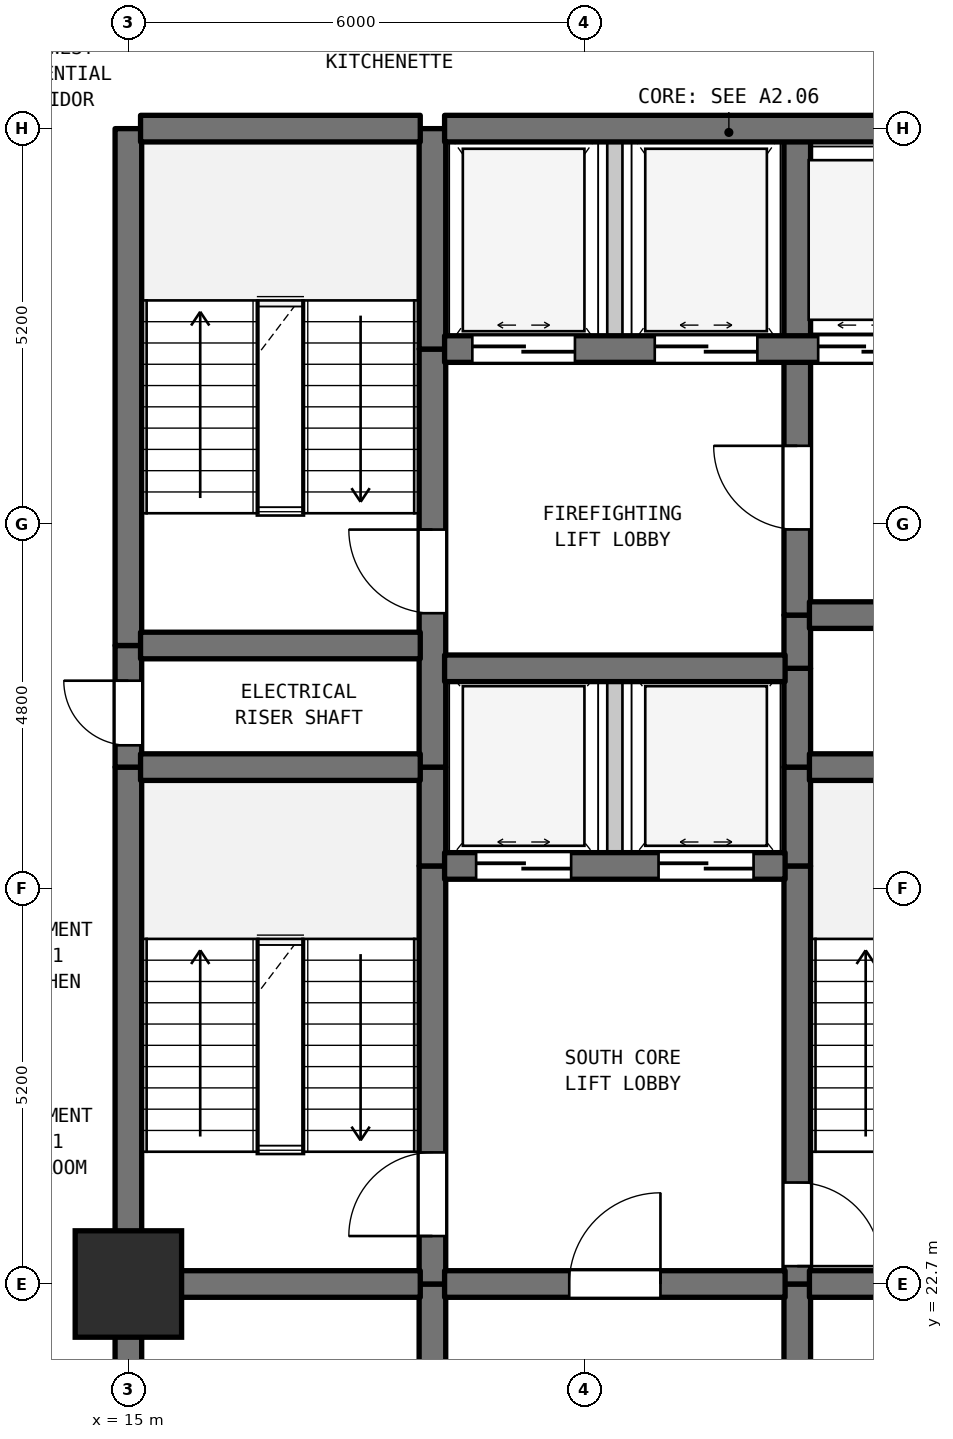
"""IFC4 building model, lengths in metres.
Left out: names, types, materials, properties, quantities, classifications, styles, units other than length and angle.
Written with IfcOpenShell. Run it as: python <this file> out.ifc"""

import sys

from ifc_helpers import new_model, si_unit, direction, frame, frame_2d, origin, origin_2d, place, context, subcontext, project, spatial, rectangle, extrude, element, fill, save


model = new_model("IFC4")
c1 = context("Model", 3, precision=1e-05, world=origin(), true_north=direction((0.0, 1.0)))
c2 = subcontext(c1, "Body", "Model", "MODEL_VIEW")
j1 = project(units=[si_unit("LENGTHUNIT", "METRE"), si_unit("PLANEANGLEUNIT", "RADIAN")], contexts=[c1])
p1 = place(None, origin())
s1 = spatial("IfcSite", under=j1, at=p1, CompositionType="ELEMENT")
p2 = place(p1, origin())
s2 = spatial("IfcBuilding", under=s1, at=p2, CompositionType="ELEMENT")
p3 = place(p2, frame((0.0, 0.0, 31.4)))
s3 = spatial("IfcBuildingStorey", under=s2, at=p3, CompositionType="ELEMENT", Elevation=31.4)
p4 = place(p3, frame((15.0, 22.7, 0.0), z_axis=(0.0, 0.0, 1.0), x_axis=(1.0, 0.0, 0.0)))
e1 = element("IfcColumn", 1, at=p4, inside=s3, PredefinedType="COLUMN", context=c2, shape_type="SweptSolid", body=[
    extrude(rectangle(XDim=1.4, YDim=1.4, at=origin_2d()), origin(), (0.0, 0.0, 1.0), 3.7),
])
p5 = place(p3, frame((15.0, 19.5, 0.0), z_axis=(0.0, 0.0, 1.0), x_axis=(0.0, 1.0, 0.0)))
e2 = element("IfcWall", 2, at=p5, inside=s3, PredefinedType="SHEAR", context=c2, shape_type="SweptSolid", body=[
    extrude(rectangle(XDim=3.2, YDim=0.35, at=frame_2d((1.6, 0.0))), origin(), (0.0, 0.0, 1.0), 3.385),
])
p6 = place(p3, frame((15.0, 22.7, 0.0), z_axis=(0.0, 0.0, 1.0), x_axis=(0.0, 1.0, 0.0)))
e3 = element("IfcWall", 3, at=p6, inside=s3, PredefinedType="SHEAR", context=c2, shape_type="SweptSolid", body=[
    extrude(rectangle(XDim=6.8, YDim=0.35, at=frame_2d((3.4, 0.0))), origin(), (0.0, 0.0, 1.0), 3.385),
])
p7 = place(p3, frame((15.0, 29.5, 0.0), z_axis=(0.0, 0.0, 1.0), x_axis=(0.0, 1.0, 0.0)))
e4 = element("IfcWall", 4, at=p7, inside=s3, PredefinedType="SHEAR", context=c2, shape_type="SweptSolid", body=[
    extrude(rectangle(XDim=1.6, YDim=0.35, at=frame_2d((0.8, 0.0))), origin(), (0.0, 0.0, 1.0), 3.385),
])
p8 = place(p7, frame((0.287, 0.0, 0.0)))
e5 = element("IfcOpeningElement", 5, at=p8, cuts=e4, PredefinedType="OPENING", context=c2, shape_type="SweptSolid", body=[
    extrude(rectangle(XDim=0.85, YDim=2.1, at=frame_2d((0.425, 1.05))), frame((0.0, 0.185, 0.0), z_axis=(0.0, -1.0, 0.0), x_axis=(1.0, 0.0, 0.0)), (0.0, 0.0, 1.0), 0.37),
])
p9 = place(p3, frame((15.0, 31.1, 0.0), z_axis=(0.0, 0.0, 1.0), x_axis=(0.0, 1.0, 0.0)))
e6 = element("IfcWall", 6, at=p9, inside=s3, PredefinedType="SHEAR", context=c2, shape_type="SweptSolid", body=[
    extrude(rectangle(XDim=6.8, YDim=0.35, at=frame_2d((3.4, 0.0))), origin(), (0.0, 0.0, 1.0), 3.385),
])
p10 = place(p3, frame((19.0, 19.5, 0.0), z_axis=(0.0, 0.0, 1.0), x_axis=(0.0, 1.0, 0.0)))
e7 = element("IfcWall", 7, at=p10, inside=s3, PredefinedType="SHEAR", context=c2, shape_type="SweptSolid", body=[
    extrude(rectangle(XDim=3.2, YDim=0.35, at=frame_2d((1.6, 0.0))), origin(), (0.0, 0.0, 1.0), 3.385),
])
p11 = place(p3, frame((19.0, 22.7, 0.0), z_axis=(0.0, 0.0, 1.0), x_axis=(0.0, 1.0, 0.0)))
e8 = element("IfcWall", 8, at=p11, inside=s3, PredefinedType="SHEAR", context=c2, shape_type="SweptSolid", body=[
    extrude(rectangle(XDim=5.5, YDim=0.35, at=frame_2d((2.75, 0.0))), origin(), (0.0, 0.0, 1.0), 3.385),
])
p12 = place(p11, frame((0.631, 0.0, 0.0)))
e9 = element("IfcOpeningElement", 9, at=p12, cuts=e8, PredefinedType="OPENING", context=c2, shape_type="SweptSolid", body=[
    extrude(rectangle(XDim=1.1, YDim=2.15, at=frame_2d((0.55, 1.075))), frame((0.0, 0.185, 0.0), z_axis=(0.0, -1.0, 0.0), x_axis=(1.0, 0.0, 0.0)), (0.0, 0.0, 1.0), 0.37),
])
p13 = place(p3, frame((19.0, 28.2, 0.0), z_axis=(0.0, 0.0, 1.0), x_axis=(0.0, 1.0, 0.0)))
e10 = element("IfcWall", 10, at=p13, inside=s3, PredefinedType="SHEAR", context=c2, shape_type="SweptSolid", body=[
    extrude(rectangle(XDim=1.3, YDim=0.35, at=frame_2d((0.65, 0.0))), origin(), (0.0, 0.0, 1.0), 3.385),
])
p14 = place(p3, frame((19.0, 29.5, 0.0), z_axis=(0.0, 0.0, 1.0), x_axis=(0.0, 1.0, 0.0)))
e11 = element("IfcWall", 11, at=p14, inside=s3, PredefinedType="SHEAR", context=c2, shape_type="SweptSolid", body=[
    extrude(rectangle(XDim=5.5, YDim=0.35, at=frame_2d((2.75, 0.0))), origin(), (0.0, 0.0, 1.0), 3.385),
])
p15 = place(p14, frame((2.025, 0.0, 0.0)))
e12 = element("IfcOpeningElement", 12, at=p15, cuts=e11, PredefinedType="OPENING", context=c2, shape_type="SweptSolid", body=[
    extrude(rectangle(XDim=1.1, YDim=2.15, at=frame_2d((0.55, 1.075))), frame((0.0, 0.185, 0.0), z_axis=(0.0, -1.0, 0.0), x_axis=(1.0, 0.0, 0.0)), (0.0, 0.0, 1.0), 0.37),
])
p16 = place(p3, frame((19.0, 35.0, 0.0), z_axis=(0.0, 0.0, 1.0), x_axis=(0.0, 1.0, 0.0)))
e13 = element("IfcWall", 13, at=p16, inside=s3, PredefinedType="SHEAR", context=c2, shape_type="SweptSolid", body=[
    extrude(rectangle(XDim=2.9, YDim=0.35, at=frame_2d((1.45, 0.0))), origin(), (0.0, 0.0, 1.0), 3.385),
])
p17 = place(p3, frame((21.4, 28.2, 0.0), z_axis=(0.0, 0.0, 1.0), x_axis=(0.0, 1.0, 0.0)))
e14 = element("IfcWall", 14, at=p17, inside=s3, PredefinedType="STANDARD", context=c2, shape_type="SweptSolid", body=[
    extrude(rectangle(XDim=2.6, YDim=0.2, at=frame_2d((1.3, 0.0))), origin(), (0.0, 0.0, 1.0), 3.385),
])
p18 = place(p3, frame((21.4, 35.0, 0.0), z_axis=(0.0, 0.0, 1.0), x_axis=(0.0, 1.0, 0.0)))
e15 = element("IfcWall", 15, at=p18, inside=s3, PredefinedType="STANDARD", context=c2, shape_type="SweptSolid", body=[
    extrude(rectangle(XDim=2.9, YDim=0.2, at=frame_2d((1.45, 0.0))), origin(), (0.0, 0.0, 1.0), 3.385),
])
p19 = place(p3, frame((23.8, 19.5, 0.0), z_axis=(0.0, 0.0, 1.0), x_axis=(0.0, 1.0, 0.0)))
e16 = element("IfcWall", 16, at=p19, inside=s3, PredefinedType="SHEAR", context=c2, shape_type="SweptSolid", body=[
    extrude(rectangle(XDim=3.2, YDim=0.35, at=frame_2d((1.6, 0.0))), origin(), (0.0, 0.0, 1.0), 3.385),
])
p20 = place(p3, frame((23.8, 22.7, 0.0), z_axis=(0.0, 0.0, 1.0), x_axis=(0.0, 1.0, 0.0)))
e17 = element("IfcWall", 17, at=p20, inside=s3, PredefinedType="SHEAR", context=c2, shape_type="SweptSolid", body=[
    extrude(rectangle(XDim=5.5, YDim=0.35, at=frame_2d((2.75, 0.0))), origin(), (0.0, 0.0, 1.0), 3.385),
])
p21 = place(p20, frame((0.235, 0.0, 0.0)))
e18 = element("IfcOpeningElement", 18, at=p21, cuts=e17, PredefinedType="OPENING", context=c2, shape_type="SweptSolid", body=[
    extrude(rectangle(XDim=1.1, YDim=2.15, at=frame_2d((0.55, 1.075))), frame((0.0, 0.185, 0.0), z_axis=(0.0, -1.0, 0.0), x_axis=(1.0, 0.0, 0.0)), (0.0, 0.0, 1.0), 0.37),
])
for number, where, z_axis, x_axis in (
    (19, (23.8, 28.2, 0.0), (0.0, 0.0, 1.0), (0.0, 1.0, 0.0)),
    (20, (23.8, 29.5, 0.0), (0.0, 0.0, 1.0), (0.0, 1.0, 0.0)),
):
    element("IfcWall", number, at=place(p3, frame(where, z_axis=z_axis, x_axis=x_axis)), inside=s3, PredefinedType="SHEAR", context=c2, shape_type="SweptSolid", body=[
        extrude(rectangle(XDim=1.3, YDim=0.35, at=frame_2d((0.65, 0.0))), origin(), (0.0, 0.0, 1.0), 3.385),
    ])
p22 = place(p3, frame((23.8, 30.8, 0.0), z_axis=(0.0, 0.0, 1.0), x_axis=(0.0, 1.0, 0.0)))
e21 = element("IfcWall", 21, at=p22, inside=s3, PredefinedType="SHEAR", context=c2, shape_type="SweptSolid", body=[
    extrude(rectangle(XDim=0.7, YDim=0.35, at=frame_2d((0.35, 0.0))), origin(), (0.0, 0.0, 1.0), 3.385),
])
p23 = place(p3, frame((23.8, 31.5, 0.0), z_axis=(0.0, 0.0, 1.0), x_axis=(0.0, 1.0, 0.0)))
e22 = element("IfcWall", 22, at=p23, inside=s3, PredefinedType="SHEAR", context=c2, shape_type="SweptSolid", body=[
    extrude(rectangle(XDim=3.5, YDim=0.35, at=frame_2d((1.75, 0.0))), origin(), (0.0, 0.0, 1.0), 3.385),
])
p24 = place(p23, frame((1.127, 0.0, 0.0)))
e23 = element("IfcOpeningElement", 23, at=p24, cuts=e22, PredefinedType="OPENING", context=c2, shape_type="SweptSolid", body=[
    extrude(rectangle(XDim=1.1, YDim=2.15, at=frame_2d((0.55, 1.075))), frame((0.0, 0.185, 0.0), z_axis=(0.0, -1.0, 0.0), x_axis=(1.0, 0.0, 0.0)), (0.0, 0.0, 1.0), 0.37),
])
p25 = place(p3, frame((23.8, 35.0, 0.0), z_axis=(0.0, 0.0, 1.0), x_axis=(0.0, 1.0, 0.0)))
e24 = element("IfcWall", 24, at=p25, inside=s3, PredefinedType="SHEAR", context=c2, shape_type="SweptSolid", body=[
    extrude(rectangle(XDim=2.9, YDim=0.35, at=frame_2d((1.45, 0.0))), origin(), (0.0, 0.0, 1.0), 3.385),
])
p26 = place(p3, frame((15.16, 22.7, 0.0), z_axis=(0.0, 0.0, 1.0), x_axis=(1.0, 0.0, 0.0)))
e25 = element("IfcWall", 25, at=p26, inside=s3, PredefinedType="SHEAR", context=c2, shape_type="SweptSolid", body=[
    extrude(rectangle(XDim=3.68, YDim=0.35, at=frame_2d((1.84, 0.0))), origin(), (0.0, 0.0, 1.0), 3.385),
])
p27 = place(p3, frame((19.16, 22.7, 0.0), z_axis=(0.0, 0.0, 1.0), x_axis=(1.0, 0.0, 0.0)))
e26 = element("IfcWall", 26, at=p27, inside=s3, PredefinedType="SHEAR", context=c2, shape_type="SweptSolid", body=[
    extrude(rectangle(XDim=4.48, YDim=0.35, at=frame_2d((2.24, 0.0))), origin(), (0.0, 0.0, 1.0), 3.385),
])
p28 = place(p27, frame((1.64, 0.0, 0.0)))
e27 = element("IfcOpeningElement", 27, at=p28, cuts=e26, PredefinedType="OPENING", context=c2, shape_type="SweptSolid", body=[
    extrude(rectangle(XDim=1.2, YDim=2.2, at=frame_2d((0.6, 1.1))), frame((0.0, 0.185, 0.0), z_axis=(0.0, -1.0, 0.0), x_axis=(1.0, 0.0, 0.0)), (0.0, 0.0, 1.0), 0.37),
])
p29 = place(p3, frame((23.96, 22.7, 0.0), z_axis=(0.0, 0.0, 1.0), x_axis=(1.0, 0.0, 0.0)))
e28 = element("IfcWall", 28, at=p29, inside=s3, PredefinedType="SHEAR", context=c2, shape_type="SweptSolid", body=[
    extrude(rectangle(XDim=1.855, YDim=0.35, at=frame_2d((0.927, 0.0))), origin(), (0.0, 0.0, 1.0), 3.385),
])
p30 = place(p3, frame((19.16, 28.2, 0.0), z_axis=(0.0, 0.0, 1.0), x_axis=(1.0, 0.0, 0.0)))
e29 = element("IfcWall", 29, at=p30, inside=s3, PredefinedType="SHEAR", context=c2, shape_type="SweptSolid", body=[
    extrude(rectangle(XDim=4.48, YDim=0.35, at=frame_2d((2.24, 0.0))), origin(), (0.0, 0.0, 1.0), 3.385),
])
p31 = place(p30, frame((0.415, 0.0, 0.0)))
e30 = element("IfcOpeningElement", 30, at=p31, cuts=e29, PredefinedType="OPENING", context=c2, shape_type="SweptSolid", body=[
    extrude(rectangle(XDim=1.25, YDim=2.2, at=frame_2d((0.625, 1.1))), frame((0.0, 0.185, 0.0), z_axis=(0.0, -1.0, 0.0), x_axis=(1.0, 0.0, 0.0)), (0.0, 0.0, 1.0), 0.37),
])
p32 = place(p30, frame((2.815, 0.0, 0.0)))
e31 = element("IfcOpeningElement", 31, at=p32, cuts=e29, PredefinedType="OPENING", context=c2, shape_type="SweptSolid", body=[
    extrude(rectangle(XDim=1.25, YDim=2.2, at=frame_2d((0.625, 1.1))), frame((0.0, 0.185, 0.0), z_axis=(0.0, -1.0, 0.0), x_axis=(1.0, 0.0, 0.0)), (0.0, 0.0, 1.0), 0.37),
])
p33 = place(p3, frame((15.16, 29.5, 0.0), z_axis=(0.0, 0.0, 1.0), x_axis=(1.0, 0.0, 0.0)))
e32 = element("IfcWall", 32, at=p33, inside=s3, PredefinedType="SHEAR", context=c2, shape_type="SweptSolid", body=[
    extrude(rectangle(XDim=3.68, YDim=0.35, at=frame_2d((1.84, 0.0))), origin(), (0.0, 0.0, 1.0), 3.385),
])
p34 = place(p3, frame((23.96, 29.5, 0.0), z_axis=(0.0, 0.0, 1.0), x_axis=(1.0, 0.0, 0.0)))
e33 = element("IfcWall", 33, at=p34, inside=s3, PredefinedType="SHEAR", context=c2, shape_type="SweptSolid", body=[
    extrude(rectangle(XDim=3.18, YDim=0.35, at=frame_2d((1.59, 0.0))), origin(), (0.0, 0.0, 1.0), 3.385),
])
p35 = place(p3, frame((19.16, 30.8, 0.0), z_axis=(0.0, 0.0, 1.0), x_axis=(1.0, 0.0, 0.0)))
e34 = element("IfcWall", 34, at=p35, inside=s3, PredefinedType="SHEAR", context=c2, shape_type="SweptSolid", body=[
    extrude(rectangle(XDim=4.48, YDim=0.35, at=frame_2d((2.24, 0.0))), origin(), (0.0, 0.0, 1.0), 3.385),
])
p36 = place(p3, frame((15.16, 31.1, 0.0), z_axis=(0.0, 0.0, 1.0), x_axis=(1.0, 0.0, 0.0)))
e35 = element("IfcWall", 35, at=p36, inside=s3, PredefinedType="SHEAR", context=c2, shape_type="SweptSolid", body=[
    extrude(rectangle(XDim=3.68, YDim=0.35, at=frame_2d((1.84, 0.0))), origin(), (0.0, 0.0, 1.0), 3.385),
])
p37 = place(p3, frame((23.96, 31.5, 0.0), z_axis=(0.0, 0.0, 1.0), x_axis=(1.0, 0.0, 0.0)))
e36 = element("IfcWall", 36, at=p37, inside=s3, PredefinedType="SHEAR", context=c2, shape_type="SweptSolid", body=[
    extrude(rectangle(XDim=3.18, YDim=0.35, at=frame_2d((1.59, 0.0))), origin(), (0.0, 0.0, 1.0), 3.385),
])
p38 = place(p37, frame((1.094, 0.0, 0.0)))
e37 = element("IfcOpeningElement", 37, at=p38, cuts=e36, PredefinedType="OPENING", context=c2, shape_type="SweptSolid", body=[
    extrude(rectangle(XDim=0.85, YDim=2.1, at=frame_2d((0.425, 1.05))), frame((0.0, 0.185, 0.0), z_axis=(0.0, -1.0, 0.0), x_axis=(1.0, 0.0, 0.0)), (0.0, 0.0, 1.0), 0.37),
])
p39 = place(p3, frame((19.16, 35.0, 0.0), z_axis=(0.0, 0.0, 1.0), x_axis=(1.0, 0.0, 0.0)))
e38 = element("IfcWall", 38, at=p39, inside=s3, PredefinedType="SHEAR", context=c2, shape_type="SweptSolid", body=[
    extrude(rectangle(XDim=11.48, YDim=0.35, at=frame_2d((5.74, 0.0))), origin(), (0.0, 0.0, 1.0), 3.385),
])
p40 = place(p39, frame((0.365, 0.0, 0.0)))
e39 = element("IfcOpeningElement", 39, at=p40, cuts=e38, PredefinedType="OPENING", context=c2, shape_type="SweptSolid", body=[
    extrude(rectangle(XDim=1.35, YDim=2.2, at=frame_2d((0.675, 1.1))), frame((0.0, 0.185, 0.0), z_axis=(0.0, -1.0, 0.0), x_axis=(1.0, 0.0, 0.0)), (0.0, 0.0, 1.0), 0.37),
])
p41 = place(p39, frame((2.765, 0.0, 0.0)))
e40 = element("IfcOpeningElement", 40, at=p41, cuts=e38, PredefinedType="OPENING", context=c2, shape_type="SweptSolid", body=[
    extrude(rectangle(XDim=1.35, YDim=2.2, at=frame_2d((0.675, 1.1))), frame((0.0, 0.185, 0.0), z_axis=(0.0, -1.0, 0.0), x_axis=(1.0, 0.0, 0.0)), (0.0, 0.0, 1.0), 0.37),
])
p42 = place(p39, frame((4.915, 0.0, 0.0)))
e41 = element("IfcOpeningElement", 41, at=p42, cuts=e38, PredefinedType="OPENING", context=c2, shape_type="SweptSolid", body=[
    extrude(rectangle(XDim=1.2, YDim=2.2, at=frame_2d((0.6, 1.1))), frame((0.0, 0.185, 0.0), z_axis=(0.0, -1.0, 0.0), x_axis=(1.0, 0.0, 0.0)), (0.0, 0.0, 1.0), 0.37),
])
p43 = place(p39, frame((6.665, 0.0, 0.0)))
e42 = element("IfcOpeningElement", 42, at=p43, cuts=e38, PredefinedType="OPENING", context=c2, shape_type="SweptSolid", body=[
    extrude(rectangle(XDim=1.2, YDim=2.2, at=frame_2d((0.6, 1.1))), frame((0.0, 0.185, 0.0), z_axis=(0.0, -1.0, 0.0), x_axis=(1.0, 0.0, 0.0)), (0.0, 0.0, 1.0), 0.37),
])
p44 = place(p39, frame((8.415, 0.0, 0.0)))
e43 = element("IfcOpeningElement", 43, at=p44, cuts=e38, PredefinedType="OPENING", context=c2, shape_type="SweptSolid", body=[
    extrude(rectangle(XDim=1.2, YDim=2.2, at=frame_2d((0.6, 1.1))), frame((0.0, 0.185, 0.0), z_axis=(0.0, -1.0, 0.0), x_axis=(1.0, 0.0, 0.0)), (0.0, 0.0, 1.0), 0.37),
])
p45 = place(p39, frame((10.16, 0.0, 0.0)))
e44 = element("IfcOpeningElement", 44, at=p45, cuts=e38, PredefinedType="OPENING", context=c2, shape_type="SweptSolid", body=[
    extrude(rectangle(XDim=1.2, YDim=2.2, at=frame_2d((0.6, 1.1))), frame((0.0, 0.185, 0.0), z_axis=(0.0, -1.0, 0.0), x_axis=(1.0, 0.0, 0.0)), (0.0, 0.0, 1.0), 0.37),
])
p46 = place(p3, frame((15.16, 37.9, 0.0), z_axis=(0.0, 0.0, 1.0), x_axis=(1.0, 0.0, 0.0)))
e45 = element("IfcWall", 45, at=p46, inside=s3, PredefinedType="SHEAR", context=c2, shape_type="SweptSolid", body=[
    extrude(rectangle(XDim=3.68, YDim=0.35, at=frame_2d((1.84, 0.0))), origin(), (0.0, 0.0, 1.0), 3.385),
])
p47 = place(p3, frame((19.16, 37.9, 0.0), z_axis=(0.0, 0.0, 1.0), x_axis=(1.0, 0.0, 0.0)))
e46 = element("IfcWall", 46, at=p47, inside=s3, PredefinedType="SHEAR", context=c2, shape_type="SweptSolid", body=[
    extrude(rectangle(XDim=11.48, YDim=0.35, at=frame_2d((5.74, 0.0))), origin(), (0.0, 0.0, 1.0), 3.385),
])
p48 = place(p8, origin())
e47 = element("IfcDoor", 47, at=p48, inside=s3, OperationType="SINGLE_SWING_RIGHT", PredefinedType="DOOR", context=c2, shape_type="SweptSolid", body=[
    extrude(rectangle(XDim=0.85, YDim=2.1, at=frame_2d((0.425, 1.05))), frame((0.0, 0.025, 0.0), z_axis=(0.0, -1.0, 0.0), x_axis=(1.0, 0.0, 0.0)), (0.0, 0.0, 1.0), 0.05),
])
fill(e5, e47)
p49 = place(p12, origin())
e48 = element("IfcDoor", 48, at=p49, inside=s3, OperationType="SINGLE_SWING_LEFT", PredefinedType="DOOR", context=c2, shape_type="SweptSolid", body=[
    extrude(rectangle(XDim=1.1, YDim=2.15, at=frame_2d((0.55, 1.075))), frame((0.0, 0.025, 0.0), z_axis=(0.0, -1.0, 0.0), x_axis=(1.0, 0.0, 0.0)), (0.0, 0.0, 1.0), 0.05),
])
fill(e9, e48)
p50 = place(p15, origin())
e49 = element("IfcDoor", 49, at=p50, inside=s3, OperationType="SINGLE_SWING_RIGHT", PredefinedType="DOOR", context=c2, shape_type="SweptSolid", body=[
    extrude(rectangle(XDim=1.1, YDim=2.15, at=frame_2d((0.55, 1.075))), frame((0.0, 0.025, 0.0), z_axis=(0.0, -1.0, 0.0), x_axis=(1.0, 0.0, 0.0)), (0.0, 0.0, 1.0), 0.05),
])
fill(e12, e49)
p51 = place(p21, frame((1.1, 0.0, 0.0), z_axis=(0.0, 0.0, 1.0), x_axis=(-1.0, 0.0, 0.0)))
e50 = element("IfcDoor", 50, at=p51, inside=s3, OperationType="SINGLE_SWING_LEFT", PredefinedType="DOOR", context=c2, shape_type="SweptSolid", body=[
    extrude(rectangle(XDim=1.1, YDim=2.15, at=frame_2d((0.55, 1.075))), frame((0.0, 0.025, 0.0), z_axis=(0.0, -1.0, 0.0), x_axis=(1.0, 0.0, 0.0)), (0.0, 0.0, 1.0), 0.05),
])
fill(e18, e50)
p52 = place(p24, origin())
e51 = element("IfcDoor", 51, at=p52, inside=s3, OperationType="SINGLE_SWING_RIGHT", PredefinedType="DOOR", context=c2, shape_type="SweptSolid", body=[
    extrude(rectangle(XDim=1.1, YDim=2.15, at=frame_2d((0.55, 1.075))), frame((0.0, 0.025, 0.0), z_axis=(0.0, -1.0, 0.0), x_axis=(1.0, 0.0, 0.0)), (0.0, 0.0, 1.0), 0.05),
])
fill(e23, e51)
p53 = place(p28, origin())
e52 = element("IfcDoor", 52, at=p53, inside=s3, OperationType="SINGLE_SWING_RIGHT", PredefinedType="DOOR", context=c2, shape_type="SweptSolid", body=[
    extrude(rectangle(XDim=1.2, YDim=2.2, at=frame_2d((0.6, 1.1))), frame((0.0, 0.025, 0.0), z_axis=(0.0, -1.0, 0.0), x_axis=(1.0, 0.0, 0.0)), (0.0, 0.0, 1.0), 0.05),
])
fill(e27, e52)
p54 = place(p31, origin())
e53 = element("IfcDoor", 53, at=p54, inside=s3, OperationType="DOUBLE_DOOR_SLIDING", PredefinedType="DOOR", context=c2, shape_type="SweptSolid", body=[
    extrude(rectangle(XDim=1.25, YDim=2.2, at=frame_2d((0.625, 1.1))), frame((0.0, 0.025, 0.0), z_axis=(0.0, -1.0, 0.0), x_axis=(1.0, 0.0, 0.0)), (0.0, 0.0, 1.0), 0.05),
])
fill(e30, e53)
p55 = place(p32, origin())
e54 = element("IfcDoor", 54, at=p55, inside=s3, OperationType="DOUBLE_DOOR_SLIDING", PredefinedType="DOOR", context=c2, shape_type="SweptSolid", body=[
    extrude(rectangle(XDim=1.25, YDim=2.2, at=frame_2d((0.625, 1.1))), frame((0.0, 0.025, 0.0), z_axis=(0.0, -1.0, 0.0), x_axis=(1.0, 0.0, 0.0)), (0.0, 0.0, 1.0), 0.05),
])
fill(e31, e54)
p56 = place(p40, origin())
e55 = element("IfcDoor", 55, at=p56, inside=s3, OperationType="DOUBLE_DOOR_SLIDING", PredefinedType="DOOR", context=c2, shape_type="SweptSolid", body=[
    extrude(rectangle(XDim=1.35, YDim=2.2, at=frame_2d((0.675, 1.1))), frame((0.0, 0.025, 0.0), z_axis=(0.0, -1.0, 0.0), x_axis=(1.0, 0.0, 0.0)), (0.0, 0.0, 1.0), 0.05),
])
fill(e39, e55)
p57 = place(p41, origin())
e56 = element("IfcDoor", 56, at=p57, inside=s3, OperationType="DOUBLE_DOOR_SLIDING", PredefinedType="DOOR", context=c2, shape_type="SweptSolid", body=[
    extrude(rectangle(XDim=1.35, YDim=2.2, at=frame_2d((0.675, 1.1))), frame((0.0, 0.025, 0.0), z_axis=(0.0, -1.0, 0.0), x_axis=(1.0, 0.0, 0.0)), (0.0, 0.0, 1.0), 0.05),
])
fill(e40, e56)
p58 = place(p42, origin())
e57 = element("IfcDoor", 57, at=p58, inside=s3, OperationType="DOUBLE_DOOR_SLIDING", PredefinedType="DOOR", context=c2, shape_type="SweptSolid", body=[
    extrude(rectangle(XDim=1.2, YDim=2.2, at=frame_2d((0.6, 1.1))), frame((0.0, 0.025, 0.0), z_axis=(0.0, -1.0, 0.0), x_axis=(1.0, 0.0, 0.0)), (0.0, 0.0, 1.0), 0.05),
])
fill(e41, e57)
save(model, sys.argv[1])
